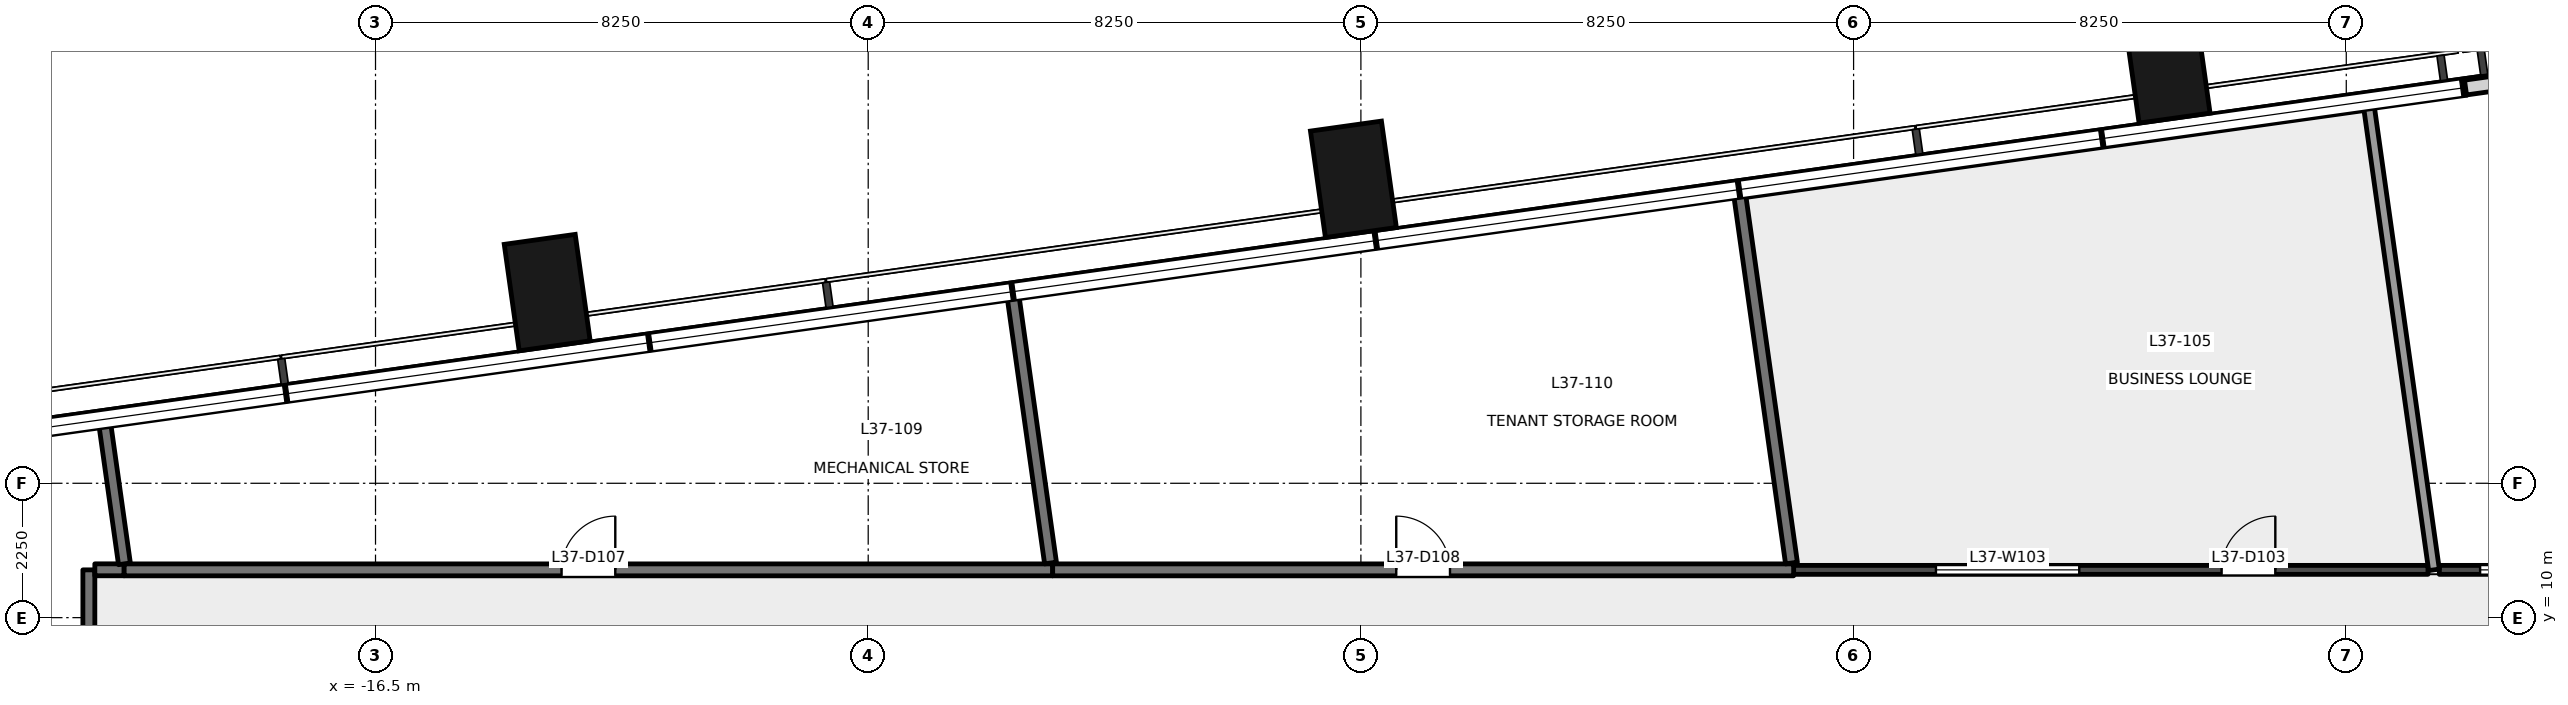
"""IFC4 building model, lengths in metres.
Left out: names, types, materials, properties, quantities, classifications, styles, units other than length and angle.
Written with IfcOpenShell. Run it as: python <this file> out.ifc"""

import sys

from ifc_helpers import new_model, si_unit, direction, frame, frame_2d, origin, origin_2d, place, context, subcontext, project, spatial, rectangle, extrude, element, fill, save


model = new_model("IFC4")
c1 = context("Model", 3, precision=1e-05, world=origin(), true_north=direction((0.0, 1.0)))
c2 = subcontext(c1, "Body", "Model", "MODEL_VIEW")
j1 = project(units=[si_unit("LENGTHUNIT", "METRE"), si_unit("PLANEANGLEUNIT", "RADIAN")], contexts=[c1])
p1 = place(None, origin())
s1 = spatial("IfcSite", under=j1, at=p1, CompositionType="ELEMENT")
p2 = place(p1, origin())
s2 = spatial("IfcBuilding", under=s1, at=p2, CompositionType="ELEMENT")
p3 = place(p2, frame((0.0, 0.0, 163.1)))
s3 = spatial("IfcBuildingStorey", under=s2, at=p3, CompositionType="ELEMENT", Elevation=163.1)
for number, where, z_axis, x_axis in (
    (1, (-13.625, 15.443, -0.2), (0.0, 0.0, 1.0), (0.99, 0.139, 0.0)),
    (2, (-0.125, 17.34, -0.2), (0.0, 0.0, 1.0), (0.99, 0.139, 0.0)),
    (3, (13.5, 19.256, -0.2), (0.0, 0.0, 1.0), (0.99, 0.139, 0.0)),
):
    element("IfcColumn", number, at=place(p3, frame(where, z_axis=z_axis, x_axis=x_axis)), inside=s3, PredefinedType="COLUMN", context=c2, shape_type="SweptSolid", body=[
        extrude(rectangle(XDim=1.2, YDim=1.8, at=origin_2d()), origin(), (0.0, 0.0, 1.0), 5.4),
    ])
p4 = place(p3, frame((21.422, 19.288, 0.0), z_axis=(0.0, 0.0, 1.0), x_axis=(-0.990246427036, -0.139327002919, 0.0)))
e4 = element("IfcWall", 4, at=p4, inside=s3, PredefinedType="SOLIDWALL", context=c2, shape_type="SweptSolid", body=[
    extrude(rectangle(XDim=2.954, YDim=0.25, at=frame_2d((1.477, 0.0))), origin(), (0.0, 0.0, 1.0), 5.2),
])
p5 = place(p3, frame((7.246, 10.8, 0.0), z_axis=(0.0, 0.0, 1.0), x_axis=(1.0, 0.0, 0.0)))
e5 = element("IfcWall", 5, at=p5, inside=s3, PredefinedType="PARTITIONING", context=c2, shape_type="SweptSolid", body=[
    extrude(rectangle(XDim=10.622, YDim=0.15, at=frame_2d((5.311, 0.0))), origin(), (0.0, 0.0, 1.0), 4.7),
])
p6 = place(p5, frame((7.166, 0.0, 0.0)))
e6 = element("IfcOpeningElement", 6, at=p6, cuts=e5, PredefinedType="OPENING", context=c2, shape_type="SweptSolid", body=[
    extrude(rectangle(XDim=0.9, YDim=2.1, at=frame_2d((0.45, 1.05))), frame((0.0, 0.085, 0.0), z_axis=(0.0, -1.0, 0.0), x_axis=(1.0, 0.0, 0.0)), (0.0, 0.0, 1.0), 0.171),
])
p7 = place(p5, frame((2.383, 0.0, 0.0)))
e7 = element("IfcOpeningElement", 7, at=p7, cuts=e5, PredefinedType="OPENING", context=c2, shape_type="SweptSolid", body=[
    extrude(rectangle(XDim=2.4, YDim=2.4, at=frame_2d((1.2, 1.2))), frame((0.0, 0.085, 0.0), z_axis=(0.0, -1.0, 0.0), x_axis=(1.0, 0.0, 0.0)), (0.0, 0.0, 1.0), 0.171),
])
p8 = place(p3, frame((18.058, 10.8, 0.0), z_axis=(0.0, 0.0, 1.0), x_axis=(1.0, 0.0, 0.0)))
e8 = element("IfcWall", 8, at=p8, inside=s3, PredefinedType="PARTITIONING", context=c2, shape_type="SweptSolid", body=[
    extrude(rectangle(XDim=3.167, YDim=0.15, at=frame_2d((1.583, 0.0))), origin(), (0.0, 0.0, 1.0), 5.2),
])
p9 = place(p8, frame((0.683, 0.0, 0.0)))
e9 = element("IfcOpeningElement", 9, at=p9, cuts=e8, PredefinedType="OPENING", context=c2, shape_type="SweptSolid", body=[
    extrude(rectangle(XDim=1.8, YDim=2.4, at=frame_2d((0.9, 1.2))), frame((0.0, 0.085, 0.0), z_axis=(0.0, -1.0, 0.0), x_axis=(1.0, 0.0, 0.0)), (0.0, 0.0, 1.0), 0.171),
])
p10 = place(p3, frame((-21.3, -12.9, 0.0), z_axis=(0.0, 0.0, 1.0), x_axis=(0.0, 1.0, 0.0)))
e10 = element("IfcWall", 10, at=p10, inside=s3, PredefinedType="PARTITIONING", context=c2, shape_type="SweptSolid", body=[
    extrude(rectangle(XDim=23.7, YDim=0.2, at=frame_2d((11.85, 0.0))), origin(), (0.0, 0.0, 1.0), 4.7),
])
p11 = place(p10, frame((11.4, 0.0, 0.0)))
e11 = element("IfcOpeningElement", 11, at=p11, cuts=e10, PredefinedType="OPENING", context=c2, shape_type="SweptSolid", body=[
    extrude(rectangle(XDim=0.9, YDim=2.1, at=frame_2d((0.45, 1.05))), frame((0.0, 0.111, 0.0), z_axis=(0.0, -1.0, 0.0), x_axis=(1.0, 0.0, 0.0)), (0.0, 0.0, 1.0), 0.221),
])
p12 = place(p3, frame((-21.2, 10.801, 0.0), z_axis=(0.0, 0.0, 1.0), x_axis=(1.0, 0.0, 0.0)))
e12 = element("IfcWall", 12, at=p12, inside=s3, PredefinedType="PARTITIONING", context=c2, shape_type="SweptSolid", body=[
    extrude(rectangle(XDim=0.491, YDim=0.2, at=frame_2d((0.246, 0.0))), origin(), (0.0, 0.0, 1.0), 5.2),
])
p13 = place(p3, frame((-20.709, 10.8, 0.0), z_axis=(0.0, 0.0, 1.0), x_axis=(1.0, 0.0, 0.0)))
e13 = element("IfcWall", 13, at=p13, inside=s3, PredefinedType="PARTITIONING", context=c2, shape_type="SweptSolid", body=[
    extrude(rectangle(XDim=15.548, YDim=0.2, at=frame_2d((7.774, 0.0))), origin(), (0.0, 0.0, 1.0), 4.8),
])
p14 = place(p13, frame((7.324, 0.0, 0.0)))
e14 = element("IfcOpeningElement", 14, at=p14, cuts=e13, PredefinedType="OPENING", context=c2, shape_type="SweptSolid", body=[
    extrude(rectangle(XDim=0.9, YDim=2.1, at=frame_2d((0.45, 1.05))), frame((0.0, 0.111, 0.0), z_axis=(0.0, -1.0, 0.0), x_axis=(1.0, 0.0, 0.0)), (0.0, 0.0, 1.0), 0.221),
])
p15 = place(p3, frame((-5.161, 10.8, 0.0), z_axis=(0.0, 0.0, 1.0), x_axis=(1.0, 0.0, 0.0)))
e15 = element("IfcWall", 15, at=p15, inside=s3, PredefinedType="PARTITIONING", context=c2, shape_type="SweptSolid", body=[
    extrude(rectangle(XDim=12.407, YDim=0.2, at=frame_2d((6.204, 0.0))), origin(), (0.0, 0.0, 1.0), 4.75),
])
p16 = place(p15, frame((5.753, 0.0, 0.0)))
e16 = element("IfcOpeningElement", 16, at=p16, cuts=e15, PredefinedType="OPENING", context=c2, shape_type="SweptSolid", body=[
    extrude(rectangle(XDim=0.9, YDim=2.1, at=frame_2d((0.45, 1.05))), frame((0.0, 0.111, 0.0), z_axis=(0.0, -1.0, 0.0), x_axis=(1.0, 0.0, 0.0)), (0.0, 0.0, 1.0), 0.221),
])
p17 = place(p3, frame((16.879, 18.559, 0.0), z_axis=(0.0, 0.0, 1.0), x_axis=(0.139126403365, -0.990274630538, 0.0)))
e17 = element("IfcWall", 17, at=p17, inside=s3, PredefinedType="PARTITIONING", context=c2, shape_type="SweptSolid", body=[
    extrude(rectangle(XDim=7.835, YDim=0.18, at=frame_2d((3.917, 0.0))), origin(), (0.0, 0.0, 1.0), 5.2),
])
p18 = place(p3, frame((7.21, 10.914, 0.0), z_axis=(0.0, 0.0, 1.0), x_axis=(-0.139301113036, 0.99025006938, 0.0)))
e18 = element("IfcWall", 18, at=p18, inside=s3, PredefinedType="PARTITIONING", context=c2, shape_type="SweptSolid", body=[
    extrude(rectangle(XDim=6.224, YDim=0.2, at=frame_2d((3.112, 0.0))), origin(), (0.0, 0.0, 1.0), 5.2),
])
p19 = place(p3, frame((-21.032, 13.231, 0.0), z_axis=(0.0, 0.0, 1.0), x_axis=(0.139343856524, -0.990244055599, 0.0)))
e19 = element("IfcWall", 19, at=p19, inside=s3, PredefinedType="PARTITIONING", context=c2, shape_type="SweptSolid", body=[
    extrude(rectangle(XDim=2.353, YDim=0.2, at=frame_2d((1.177, 0.0))), origin(), (0.0, 0.0, 1.0), 5.2),
])
p20 = place(p3, frame((-5.823, 15.367, 0.0), z_axis=(0.0, 0.0, 1.0), x_axis=(0.139209077392, -0.990263011917, 0.0)))
e20 = element("IfcWall", 20, at=p20, inside=s3, PredefinedType="PARTITIONING", context=c2, shape_type="SweptSolid", body=[
    extrude(rectangle(XDim=4.497, YDim=0.2, at=frame_2d((2.248, 0.0))), origin(), (0.0, 0.0, 1.0), 5.2),
])
p21 = place(p6, origin())
e21 = element("IfcDoor", 21, at=p21, inside=s3, OperationType="SINGLE_SWING_RIGHT", PredefinedType="DOOR", context=c2, shape_type="SweptSolid", body=[
    extrude(rectangle(XDim=0.9, YDim=2.1, at=frame_2d((0.45, 1.05))), frame((0.0, 0.025, 0.0), z_axis=(0.0, -1.0, 0.0), x_axis=(1.0, 0.0, 0.0)), (0.0, 0.0, 1.0), 0.05),
])
fill(e6, e21)
p22 = place(p14, origin())
e22 = element("IfcDoor", 22, at=p22, inside=s3, OperationType="SINGLE_SWING_RIGHT", PredefinedType="DOOR", context=c2, shape_type="SweptSolid", body=[
    extrude(rectangle(XDim=0.9, YDim=2.1, at=frame_2d((0.45, 1.05))), frame((0.0, 0.025, 0.0), z_axis=(0.0, -1.0, 0.0), x_axis=(1.0, 0.0, 0.0)), (0.0, 0.0, 1.0), 0.05),
])
fill(e14, e22)
p23 = place(p16, origin())
e23 = element("IfcDoor", 23, at=p23, inside=s3, OperationType="SINGLE_SWING_LEFT", PredefinedType="DOOR", context=c2, shape_type="SweptSolid", body=[
    extrude(rectangle(XDim=0.9, YDim=2.1, at=frame_2d((0.45, 1.05))), frame((0.0, 0.025, 0.0), z_axis=(0.0, -1.0, 0.0), x_axis=(1.0, 0.0, 0.0)), (0.0, 0.0, 1.0), 0.05),
])
fill(e16, e23)
p24 = place(p7, origin())
e24 = element("IfcWindow", 24, at=p24, inside=s3, PartitioningType="SINGLE_PANEL", PredefinedType="WINDOW", context=c2, shape_type="SweptSolid", body=[
    extrude(rectangle(XDim=2.4, YDim=2.4, at=frame_2d((1.2, 1.2))), frame((0.0, 0.03, 0.0), z_axis=(0.0, -1.0, 0.0), x_axis=(1.0, 0.0, 0.0)), (0.0, 0.0, 1.0), 0.06),
])
fill(e7, e24)
p25 = place(p9, origin())
e25 = element("IfcWindow", 25, at=p25, inside=s3, PartitioningType="SINGLE_PANEL", PredefinedType="WINDOW", context=c2, shape_type="SweptSolid", body=[
    extrude(rectangle(XDim=1.8, YDim=2.4, at=frame_2d((0.9, 1.2))), frame((0.0, 0.03, 0.0), z_axis=(0.0, -1.0, 0.0), x_axis=(1.0, 0.0, 0.0)), (0.0, 0.0, 1.0), 0.06),
])
fill(e9, e25)
save(model, sys.argv[1])
